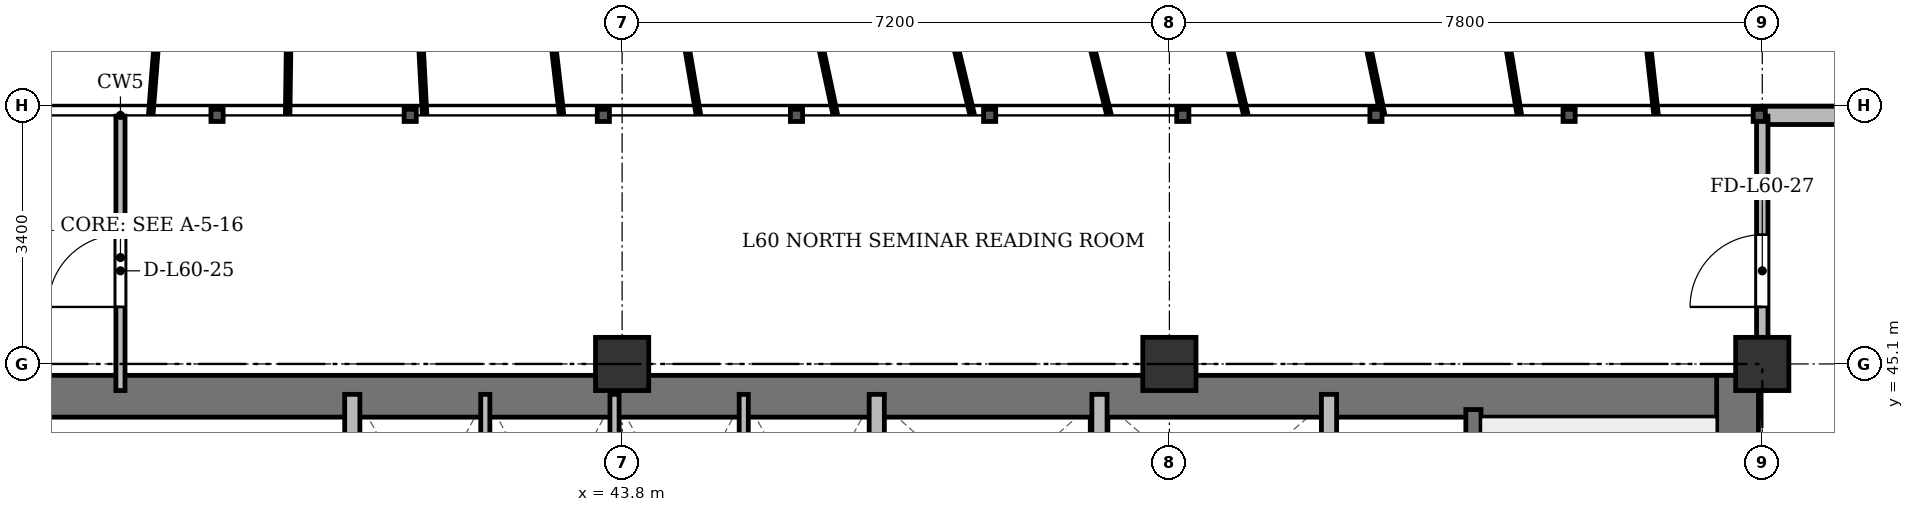
"""IFC4 building model, lengths in metres.
Left out: names, types, materials, properties, quantities, classifications, styles, units other than length and angle.
Written with IfcOpenShell. Run it as: python <this file> out.ifc"""

import sys

from ifc_helpers import new_model, si_unit, direction, frame, frame_2d, origin, origin_2d, place, context, subcontext, project, spatial, rectangle, extrude, source, transform, mapped, element, fill, save


model = new_model("IFC4")
c1 = context("Model", 3, precision=1e-05, world=origin(), true_north=direction((0.0, 1.0)))
c2 = subcontext(c1, "Body", "Model", "MODEL_VIEW")
j1 = project(units=[si_unit("LENGTHUNIT", "METRE"), si_unit("PLANEANGLEUNIT", "RADIAN")], contexts=[c1])
p1 = place(None, origin())
s1 = spatial("IfcSite", under=j1, at=p1, CompositionType="ELEMENT")
p2 = place(p1, origin())
s2 = spatial("IfcBuilding", under=s1, at=p2, CompositionType="ELEMENT")
p3 = place(p2, frame((0.0, 0.0, 230.1)))
s3 = spatial("IfcBuildingStorey", under=s2, at=p3, CompositionType="ELEMENT", Elevation=230.1)
m1 = source(origin(), c2, "Body", "SweptSolid", [
    extrude(rectangle(XDim=0.7, YDim=0.7, at=origin_2d()), origin(), (0.0, 0.0, 1.0), 3.6),
])
for number, where, z_axis, x_axis in (
    (1, (43.8, 45.1, 0.0), (0.0, 0.0, 1.0), (1.0, 0.0, 0.0)),
    (2, (51.0, 45.1, 0.0), (0.0, 0.0, 1.0), (1.0, 0.0, 0.0)),
    (3, (58.8, 45.1, 0.0), (0.0, 0.0, 1.0), (1.0, 0.0, 0.0)),
):
    element("IfcColumn", number, at=place(p3, frame(where, z_axis=z_axis, x_axis=x_axis)), inside=s3, PredefinedType="COLUMN", context=c2, shape_type="MappedRepresentation", body=[
        mapped(m1, transform((0.0, 0.0, 0.0), x_axis=(1.0, 0.0, 0.0), y_axis=(0.0, 1.0, 0.0), z_axis=(0.0, 0.0, 1.0), scale=1.0)),
    ])
p4 = place(p3, frame((58.8, 48.37, 0.0), z_axis=(0.0, 0.0, 1.0), x_axis=(1.0, 0.0, 0.0)))
e4 = element("IfcWall", 4, at=p4, inside=s3, PredefinedType="SOLIDWALL", context=c2, shape_type="SweptSolid", body=[
    extrude(rectangle(XDim=4.5, YDim=0.24, at=frame_2d((2.25, 0.0))), origin(), (0.0, 0.0, 1.0), 3.36),
])
p5 = place(p4, frame((1.65, 0.0, 0.9)))
e5 = element("IfcOpeningElement", 5, at=p5, cuts=e4, PredefinedType="OPENING", context=c2, shape_type="SweptSolid", body=[
    extrude(rectangle(XDim=1.2, YDim=1.65, at=frame_2d((0.6, 0.825))), frame((0.0, 0.13, 0.0), z_axis=(0.0, -1.0, 0.0), x_axis=(1.0, 0.0, 0.0)), (0.0, 0.0, 1.0), 0.26),
])
p6 = place(p3, frame((15.65, 44.675, 0.0), z_axis=(0.0, 0.0, 1.0), x_axis=(1.0, 0.0, 0.0)))
e6 = element("IfcWall", 6, at=p6, inside=s3, PredefinedType="SHEAR", context=c2, shape_type="SweptSolid", body=[
    extrude(rectangle(XDim=43.1, YDim=0.55, at=frame_2d((21.55, 0.0))), origin(), (0.0, 0.0, 1.0), 3.36),
])
p7 = place(p3, frame((58.475, 33.4, 0.0), z_axis=(0.0, 0.0, 1.0), x_axis=(0.0, 1.0, 0.0)))
e7 = element("IfcWall", 7, at=p7, inside=s3, PredefinedType="SHEAR", context=c2, shape_type="SweptSolid", body=[
    extrude(rectangle(XDim=11.55, YDim=0.55, at=frame_2d((5.775, 0.0))), origin(), (0.0, 0.0, 1.0), 3.36),
])
p8 = place(p3, frame((55.0, 33.4, 0.0), z_axis=(0.0, 0.0, 1.0), x_axis=(0.0, 1.0, 0.0)))
e8 = element("IfcWall", 8, at=p8, inside=s3, PredefinedType="SHEAR", context=c2, shape_type="SweptSolid", body=[
    extrude(rectangle(XDim=11.1, YDim=0.2, at=frame_2d((5.55, 0.0))), origin(), (0.0, 0.0, 1.0), 3.36),
])
p9 = place(p8, frame((0.85, 0.0, 0.0)))
e9 = element("IfcOpeningElement", 9, at=p9, cuts=e8, PredefinedType="OPENING", context=c2, shape_type="SweptSolid", body=[
    extrude(rectangle(XDim=1.1, YDim=2.15, at=frame_2d((0.55, 1.075))), frame((0.0, 0.11, 0.0), z_axis=(0.0, -1.0, 0.0), x_axis=(1.0, 0.0, 0.0)), (0.0, 0.0, 1.0), 0.22),
])
p10 = place(p3, frame((40.25, 41.5, 0.0), z_axis=(0.0, 0.0, 1.0), x_axis=(0.0, 1.0, 0.0)))
e10 = element("IfcWall", 10, at=p10, inside=s3, PredefinedType="SOLIDWALL", context=c2, shape_type="SweptSolid", body=[
    extrude(rectangle(XDim=3.2, YDim=0.2, at=frame_2d((1.6, 0.0))), origin(), (0.0, 0.0, 1.0), 3.36),
])
for number, where, z_axis, x_axis in (
    (11, (42.0, 41.5, 0.0), (0.0, 0.0, 1.0), (0.0, 1.0, 0.0)),
    (12, (43.7, 41.5, 0.0), (0.0, 0.0, 1.0), (0.0, 1.0, 0.0)),
    (13, (45.4, 41.5, 0.0), (0.0, 0.0, 1.0), (0.0, 1.0, 0.0)),
):
    element("IfcWall", number, at=place(p3, frame(where, z_axis=z_axis, x_axis=x_axis)), inside=s3, PredefinedType="PARTITIONING", context=c2, shape_type="SweptSolid", body=[
        extrude(rectangle(XDim=3.2, YDim=0.12, at=frame_2d((1.6, 0.0))), origin(), (0.0, 0.0, 1.0), 3.36),
    ])
p11 = place(p3, frame((47.15, 33.4, 0.0), z_axis=(0.0, 0.0, 1.0), x_axis=(0.0, 1.0, 0.0)))
e14 = element("IfcWall", 14, at=p11, inside=s3, PredefinedType="SOLIDWALL", context=c2, shape_type="SweptSolid", body=[
    extrude(rectangle(XDim=11.3, YDim=0.2, at=frame_2d((5.65, 0.0))), origin(), (0.0, 0.0, 1.0), 2.91),
])
for number, where, z_axis, x_axis in (
    (15, (50.08, 42.05, 0.0), (0.0, 0.0, 1.0), (0.0, 1.0, 0.0)),
    (16, (53.1, 42.05, 0.0), (0.0, 0.0, 1.0), (0.0, 1.0, 0.0)),
):
    element("IfcWall", number, at=place(p3, frame(where, z_axis=z_axis, x_axis=x_axis)), inside=s3, PredefinedType="SOLIDWALL", context=c2, shape_type="SweptSolid", body=[
        extrude(rectangle(XDim=2.65, YDim=0.2, at=frame_2d((1.325, 0.0))), origin(), (0.0, 0.0, 1.0), 3.36),
    ])
p12 = place(p3, frame((37.2, 44.75, 0.0), z_axis=(0.0, 0.0, 1.0), x_axis=(0.0, 1.0, 0.0)))
e17 = element("IfcWall", 17, at=p12, inside=s3, PredefinedType="PARTITIONING", context=c2, shape_type="SweptSolid", body=[
    extrude(rectangle(XDim=3.61, YDim=0.12, at=frame_2d((1.805, 0.0))), origin(), (0.0, 0.0, 1.0), 2.91),
])
p13 = place(p12, frame((1.1, 0.0, 0.0)))
e18 = element("IfcOpeningElement", 18, at=p13, cuts=e17, PredefinedType="OPENING", context=c2, shape_type="SweptSolid", body=[
    extrude(rectangle(XDim=0.95, YDim=2.15, at=frame_2d((0.475, 1.075))), frame((0.0, 0.07, 0.0), z_axis=(0.0, -1.0, 0.0), x_axis=(1.0, 0.0, 0.0)), (0.0, 0.0, 1.0), 0.14),
])
p14 = place(p3, frame((58.8, 44.75, 0.0), z_axis=(0.0, 0.0, 1.0), x_axis=(0.0, 1.0, 0.0)))
e19 = element("IfcWall", 19, at=p14, inside=s3, PredefinedType="PARTITIONING", context=c2, shape_type="SweptSolid", body=[
    extrude(rectangle(XDim=3.61, YDim=0.15, at=frame_2d((1.805, 0.0))), origin(), (0.0, 0.0, 1.0), 2.86),
])
p15 = place(p14, frame((1.1, 0.0, 0.0)))
e20 = element("IfcOpeningElement", 20, at=p15, cuts=e19, PredefinedType="OPENING", context=c2, shape_type="SweptSolid", body=[
    extrude(rectangle(XDim=0.95, YDim=2.15, at=frame_2d((0.475, 1.075))), frame((0.0, 0.085, 0.0), z_axis=(0.0, -1.0, 0.0), x_axis=(1.0, 0.0, 0.0)), (0.0, 0.0, 1.0), 0.17),
])
m2 = source(origin(), c2, "Body", "SweptSolid", [
    extrude(rectangle(XDim=0.95, YDim=2.15, at=frame_2d((0.475, 1.075))), frame((0.0, 0.025, 0.0), z_axis=(0.0, -1.0, 0.0), x_axis=(1.0, 0.0, 0.0)), (0.0, 0.0, 1.0), 0.05),
])
p16 = place(p13, origin())
e21 = element("IfcDoor", 21, at=p16, inside=s3, OperationType="SINGLE_SWING_LEFT", PredefinedType="DOOR", context=c2, shape_type="MappedRepresentation", body=[
    mapped(m2, transform((0.0, 0.0, 0.0), x_axis=(1.0, 0.0, 0.0), y_axis=(0.0, 1.0, 0.0), z_axis=(0.0, 0.0, 1.0), scale=1.0)),
])
fill(e18, e21)
p17 = place(p15, origin())
e22 = element("IfcDoor", 22, at=p17, inside=s3, OperationType="SINGLE_SWING_LEFT", PredefinedType="DOOR", context=c2, shape_type="MappedRepresentation", body=[
    mapped(m2, transform((0.0, 0.0, 0.0), x_axis=(1.0, 0.0, 0.0), y_axis=(0.0, 1.0, 0.0), z_axis=(0.0, 0.0, 1.0), scale=1.0)),
])
fill(e20, e22)
save(model, sys.argv[1])
